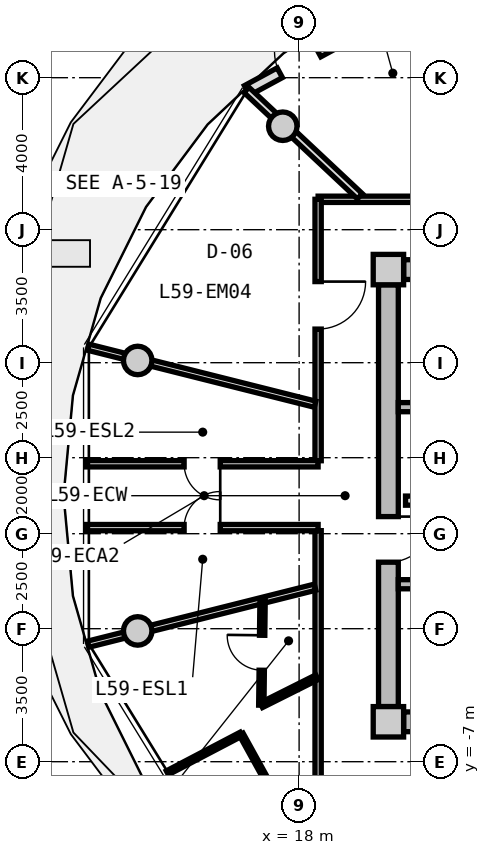
"""IFC4 building model, lengths in metres.
Left out: names, types, materials, properties, quantities, classifications, styles, units other than length and angle.
Written with IfcOpenShell. Run it as: python <this file> out.ifc"""

import sys

from ifc_helpers import new_model, si_unit, direction, frame, frame_2d, origin, origin_2d, place, context, subcontext, project, spatial, rectangle, circle, extrude, source, transform, mapped, element, fill, save


model = new_model("IFC4")
c1 = context("Model", 3, precision=1e-05, world=origin(), true_north=direction((0.0, 1.0)))
c2 = subcontext(c1, "Body", "Model", "MODEL_VIEW")
j1 = project(units=[si_unit("LENGTHUNIT", "METRE"), si_unit("PLANEANGLEUNIT", "RADIAN")], contexts=[c1])
p1 = place(None, origin())
s1 = spatial("IfcSite", under=j1, at=p1, CompositionType="ELEMENT")
p2 = place(p1, origin())
s2 = spatial("IfcBuilding", under=s1, at=p2, CompositionType="ELEMENT")
p3 = place(p2, frame((0.0, 0.0, 190.65)))
s3 = spatial("IfcBuildingStorey", under=s2, at=p3, CompositionType="ELEMENT", Elevation=190.65)
m1 = source(origin(), c2, "Body", "SweptSolid", [
    extrude(rectangle(XDim=0.8, YDim=0.8, at=origin_2d()), origin(), (0.0, 0.0, 1.0), 3.05),
])
for number, where, z_axis, x_axis in (
    (1, (20.35, -5.95, 0.0), (0.0, 0.0, 1.0), (1.0, 0.0, 0.0)),
    (2, (20.35, 5.95, 0.0), (0.0, 0.0, 1.0), (1.0, 0.0, 0.0)),
):
    element("IfcColumn", number, at=place(p3, frame(where, z_axis=z_axis, x_axis=x_axis)), inside=s3, PredefinedType="COLUMN", context=c2, shape_type="MappedRepresentation", body=[
        mapped(m1, transform((0.0, 0.0, 0.0), x_axis=(1.0, 0.0, 0.0), y_axis=(0.0, 1.0, 0.0), z_axis=(0.0, 0.0, 1.0), scale=1.0)),
    ])
m2 = source(origin(), c2, "Body", "SweptSolid", [
    extrude(rectangle(XDim=14.5, YDim=0.52, at=frame_2d((7.25, 0.0))), origin(), (0.0, 0.0, 1.0), 2.81),
])
for number, where, z_axis, x_axis in (
    (3, (20.75, 5.95, 0.0), (0.0, 0.0, 1.0), (1.0, 0.0, 0.0)),
    (4, (35.25, -5.95, 0.0), (0.0, 0.0, 1.0), (-1.0, 0.0, 0.0)),
):
    element("IfcWall", number, at=place(p3, frame(where, z_axis=z_axis, x_axis=x_axis)), inside=s3, PredefinedType="SHEAR", context=c2, shape_type="MappedRepresentation", body=[
        mapped(m2, transform((0.0, 0.0, 0.0), x_axis=(1.0, 0.0, 0.0), y_axis=(0.0, 1.0, 0.0), z_axis=(0.0, 0.0, 1.0), scale=1.0)),
    ])
m3 = source(origin(), c2, "Body", "SweptSolid", [
    extrude(rectangle(XDim=11.1, YDim=0.52, at=frame_2d((5.55, 0.0))), origin(), (0.0, 0.0, 1.0), 2.81),
])
p4 = place(p3, frame((20.35, -5.55, 0.0), z_axis=(0.0, 0.0, 1.0), x_axis=(0.0, 1.0, 0.0)))
e5 = element("IfcWall", 5, at=p4, inside=s3, PredefinedType="SHEAR", context=c2, shape_type="MappedRepresentation", body=[
    mapped(m3, transform((0.0, 0.0, 0.0), x_axis=(1.0, 0.0, 0.0), y_axis=(0.0, 1.0, 0.0), z_axis=(0.0, 0.0, 1.0), scale=1.0)),
])
p5 = place(p4, frame((3.8, 0.0, 0.0)))
e6 = element("IfcOpeningElement", 6, at=p5, cuts=e5, PredefinedType="OPENING", context=c2, shape_type="SweptSolid", body=[
    extrude(rectangle(XDim=1.2, YDim=2.15, at=frame_2d((0.6, 1.075))), frame((0.0, 0.27, 0.0), z_axis=(0.0, -1.0, 0.0), x_axis=(1.0, 0.0, 0.0)), (0.0, 0.0, 1.0), 0.54),
])
m4 = source(origin(), c2, "Body", "SweptSolid", [
    extrude(circle(Radius=0.375, at=origin_2d()), origin(), (0.0, 0.0, 1.0), 3.47),
])
for number, where, z_axis, x_axis in (
    (7, (17.57, 9.723, -0.42), (0.0, 0.0, 1.0), (1.0, 0.0, 0.0)),
    (8, (13.753, 3.559, -0.42), (0.0, 0.0, 1.0), (1.0, 0.0, 0.0)),
    (9, (13.753, -3.559, -0.42), (0.0, 0.0, 1.0), (1.0, 0.0, 0.0)),
):
    element("IfcColumn", number, at=place(p3, frame(where, z_axis=z_axis, x_axis=x_axis)), inside=s3, PredefinedType="COLUMN", context=c2, shape_type="MappedRepresentation", body=[
        mapped(m4, transform((0.0, 0.0, 0.0), x_axis=(1.0, 0.0, 0.0), y_axis=(0.0, 1.0, 0.0), z_axis=(0.0, 0.0, 1.0), scale=1.0)),
    ])
m5 = source(origin(), c2, "Body", "SweptSolid", [
    extrude(rectangle(XDim=8.197, YDim=0.29, at=frame_2d((4.099, 0.0))), origin(), (0.0, 0.0, 1.0), 2.81),
])
p6 = place(p3, frame((16.63, 10.663, 0.0), z_axis=(0.0, 0.0, 1.0), x_axis=(0.879369910001, 0.476139224791, 0.0)))
e10 = element("IfcWall", 10, at=p6, inside=s3, PredefinedType="SOLIDWALL", context=c2, shape_type="MappedRepresentation", body=[
    mapped(m5, transform((0.0, 0.0, 0.0), x_axis=(1.0, 0.0, 0.0), y_axis=(0.0, 1.0, 0.0), z_axis=(0.0, 0.0, 1.0), scale=1.0)),
])
p7 = place(p6, frame((0.98, 0.0, 0.0)))
e11 = element("IfcOpeningElement", 11, at=p7, cuts=e10, PredefinedType="OPENING", context=c2, shape_type="SweptSolid", body=[
    extrude(rectangle(XDim=1.15, YDim=2.25, at=frame_2d((0.575, 1.125))), frame((0.0, 0.155, 0.0), z_axis=(0.0, -1.0, 0.0), x_axis=(1.0, 0.0, 0.0)), (0.0, 0.0, 1.0), 0.31),
])
p8 = place(p6, frame((4.448, 0.0, 0.85)))
e12 = element("IfcOpeningElement", 12, at=p8, cuts=e10, PredefinedType="OPENING", context=c2, shape_type="SweptSolid", body=[
    extrude(rectangle(XDim=1.2, YDim=1.5, at=frame_2d((0.6, 0.75))), frame((0.0, 0.155, 0.0), z_axis=(0.0, -1.0, 0.0), x_axis=(1.0, 0.0, 0.0)), (0.0, 0.0, 1.0), 0.31),
])
m6 = source(origin(), c2, "Body", "SweptSolid", [
    extrude(rectangle(XDim=7.93, YDim=0.24, at=frame_2d((3.965, 0.0))), origin(), (0.0, 0.0, 1.0), 2.81),
])
p9 = place(p3, frame((20.61, 2.33, 0.0), z_axis=(0.0, 0.0, 1.0), x_axis=(1.0, 0.0, 0.0)))
e13 = element("IfcWall", 13, at=p9, inside=s3, PredefinedType="PARTITIONING", context=c2, shape_type="MappedRepresentation", body=[
    mapped(m6, transform((0.0, 0.0, 0.0), x_axis=(1.0, 0.0, 0.0), y_axis=(0.0, 1.0, 0.0), z_axis=(0.0, 0.0, 1.0), scale=1.0)),
])
p10 = place(p3, frame((20.61, -2.33, 0.0), z_axis=(0.0, 0.0, 1.0), x_axis=(1.0, 0.0, 0.0)))
e14 = element("IfcWall", 14, at=p10, inside=s3, PredefinedType="PARTITIONING", context=c2, shape_type="MappedRepresentation", body=[
    mapped(m6, transform((0.0, 0.0, 0.0), x_axis=(1.0, 0.0, 0.0), y_axis=(0.0, 1.0, 0.0), z_axis=(0.0, 0.0, 1.0), scale=1.0)),
])
p11 = place(p10, frame((1.05, 0.0, 0.0)))
e15 = element("IfcOpeningElement", 15, at=p11, cuts=e14, PredefinedType="OPENING", context=c2, shape_type="SweptSolid", body=[
    extrude(rectangle(XDim=1.1, YDim=2.15, at=frame_2d((0.55, 1.075))), frame((0.0, 0.13, 0.0), z_axis=(0.0, -1.0, 0.0), x_axis=(1.0, 0.0, 0.0)), (0.0, 0.0, 1.0), 0.26),
])
m7 = source(origin(), c2, "Body", "SweptSolid", [
    extrude(rectangle(XDim=7.62, YDim=0.24, at=frame_2d((3.81, 0.0))), origin(), (0.0, 0.0, 1.0), 2.795),
])
p12 = place(p3, frame((20.8, -0.13, 0.0), z_axis=(0.0, 0.0, 1.0), x_axis=(1.0, 0.0, 0.0)))
e16 = element("IfcWall", 16, at=p12, inside=s3, PredefinedType="PARTITIONING", context=c2, shape_type="MappedRepresentation", body=[
    mapped(m7, transform((0.0, 0.0, 0.0), x_axis=(1.0, 0.0, 0.0), y_axis=(0.0, 1.0, 0.0), z_axis=(0.0, 0.0, 1.0), scale=1.0)),
])
p13 = place(p12, frame((6.22, 0.0, 0.0)))
e17 = element("IfcOpeningElement", 17, at=p13, cuts=e16, PredefinedType="OPENING", context=c2, shape_type="SweptSolid", body=[
    extrude(rectangle(XDim=1.0, YDim=2.1, at=frame_2d((0.5, 1.05))), frame((0.0, 0.13, 0.0), z_axis=(0.0, -1.0, 0.0), x_axis=(1.0, 0.0, 0.0)), (0.0, 0.0, 1.0), 0.26),
])
p14 = place(p12, frame((2.4, 0.0, 0.0)))
e18 = element("IfcOpeningElement", 18, at=p14, cuts=e16, PredefinedType="OPENING", context=c2, shape_type="SweptSolid", body=[
    extrude(rectangle(XDim=1.0, YDim=2.1, at=frame_2d((0.5, 1.05))), frame((0.0, 0.13, 0.0), z_axis=(0.0, -1.0, 0.0), x_axis=(1.0, 0.0, 0.0)), (0.0, 0.0, 1.0), 0.26),
])
m8 = source(origin(), c2, "Body", "SweptSolid", [
    extrude(rectangle(XDim=8.58, YDim=0.165, at=frame_2d((4.29, 0.0))), origin(), (0.0, 0.0, 1.0), 2.795),
])
p15 = place(p3, frame((18.5, 7.8, 0.0), z_axis=(0.0, 0.0, 1.0), x_axis=(1.0, 0.0, 0.0)))
e19 = element("IfcWall", 19, at=p15, inside=s3, PredefinedType="PARTITIONING", context=c2, shape_type="MappedRepresentation", body=[
    mapped(m8, transform((0.0, 0.0, 0.0), x_axis=(1.0, 0.0, 0.0), y_axis=(0.0, 1.0, 0.0), z_axis=(0.0, 0.0, 1.0), scale=1.0)),
])
p16 = place(p15, frame((2.515, 0.0, 0.0)))
e20 = element("IfcOpeningElement", 20, at=p16, cuts=e19, PredefinedType="OPENING", context=c2, shape_type="SweptSolid", body=[
    extrude(rectangle(XDim=1.05, YDim=2.15, at=frame_2d((0.525, 1.075))), frame((0.0, 0.093, 0.0), z_axis=(0.0, -1.0, 0.0), x_axis=(1.0, 0.0, 0.0)), (0.0, 0.0, 1.0), 0.185),
])
m9 = source(origin(), c2, "Body", "SweptSolid", [
    extrude(rectangle(XDim=6.88, YDim=0.165, at=frame_2d((3.44, 0.0))), origin(), (0.0, 0.0, 1.0), 2.795),
])
p17 = place(p3, frame((18.5, -7.8, 0.0), z_axis=(0.0, 0.0, 1.0), x_axis=(0.0, 1.0, 0.0)))
e21 = element("IfcWall", 21, at=p17, inside=s3, PredefinedType="PARTITIONING", context=c2, shape_type="MappedRepresentation", body=[
    mapped(m9, transform((0.0, 0.0, 0.0), x_axis=(1.0, 0.0, 0.0), y_axis=(0.0, 1.0, 0.0), z_axis=(0.0, 0.0, 1.0), scale=1.0)),
])
p18 = place(p3, frame((18.5, 0.92, 0.0), z_axis=(0.0, 0.0, 1.0), x_axis=(0.0, 1.0, 0.0)))
e22 = element("IfcWall", 22, at=p18, inside=s3, PredefinedType="PARTITIONING", context=c2, shape_type="MappedRepresentation", body=[
    mapped(m9, transform((0.0, 0.0, 0.0), x_axis=(1.0, 0.0, 0.0), y_axis=(0.0, 1.0, 0.0), z_axis=(0.0, 0.0, 1.0), scale=1.0)),
])
p19 = place(p18, frame((3.464, 0.0, 0.0)))
e23 = element("IfcOpeningElement", 23, at=p19, cuts=e22, PredefinedType="OPENING", context=c2, shape_type="SweptSolid", body=[
    extrude(rectangle(XDim=1.25, YDim=2.2, at=frame_2d((0.625, 1.1))), frame((0.0, 0.093, 0.0), z_axis=(0.0, -1.0, 0.0), x_axis=(1.0, 0.0, 0.0)), (0.0, 0.0, 1.0), 0.185),
])
m10 = source(origin(), c2, "Body", "SweptSolid", [
    extrude(rectangle(XDim=6.157, YDim=0.165, at=frame_2d((3.079, 0.0))), origin(), (0.0, 0.0, 1.0), 2.395),
])
for number, where, z_axis, x_axis in (
    (24, (18.42, 2.407, 0.0), (0.0, 0.0, 1.0), (-0.97, 0.244, 0.0)),
    (25, (18.42, -2.407, 0.0), (0.0, 0.0, 1.0), (-0.97, -0.244, 0.0)),
):
    element("IfcWall", number, at=place(p3, frame(where, z_axis=z_axis, x_axis=x_axis)), inside=s3, PredefinedType="PARTITIONING", context=c2, shape_type="MappedRepresentation", body=[
        mapped(m10, transform((0.0, 0.0, 0.0), x_axis=(1.0, 0.0, 0.0), y_axis=(0.0, 1.0, 0.0), z_axis=(0.0, 0.0, 1.0), scale=1.0)),
    ])
m11 = source(origin(), c2, "Body", "SweptSolid", [
    extrude(rectangle(XDim=6.101, YDim=0.165, at=frame_2d((3.051, 0.0))), origin(), (0.0, 0.0, 1.0), 2.795),
])
p20 = place(p3, frame((12.399, 0.84, 0.0), z_axis=(0.0, 0.0, 1.0), x_axis=(1.0, 0.0, 0.0)))
e26 = element("IfcWall", 26, at=p20, inside=s3, PredefinedType="PARTITIONING", context=c2, shape_type="MappedRepresentation", body=[
    mapped(m11, transform((0.0, 0.0, 0.0), x_axis=(1.0, 0.0, 0.0), y_axis=(0.0, 1.0, 0.0), z_axis=(0.0, 0.0, 1.0), scale=1.0)),
])
p21 = place(p20, frame((2.576, 0.0, 0.0)))
e27 = element("IfcOpeningElement", 27, at=p21, cuts=e26, PredefinedType="OPENING", context=c2, shape_type="SweptSolid", body=[
    extrude(rectangle(XDim=0.95, YDim=2.1, at=frame_2d((0.475, 1.05))), frame((0.0, 0.093, 0.0), z_axis=(0.0, -1.0, 0.0), x_axis=(1.0, 0.0, 0.0)), (0.0, 0.0, 1.0), 0.185),
])
p22 = place(p3, frame((18.5, -0.84, 0.0), z_axis=(0.0, 0.0, 1.0), x_axis=(-1.0, 0.0, 0.0)))
e28 = element("IfcWall", 28, at=p22, inside=s3, PredefinedType="PARTITIONING", context=c2, shape_type="MappedRepresentation", body=[
    mapped(m11, transform((0.0, 0.0, 0.0), x_axis=(1.0, 0.0, 0.0), y_axis=(0.0, 1.0, 0.0), z_axis=(0.0, 0.0, 1.0), scale=1.0)),
])
p23 = place(p22, frame((2.576, 0.0, 0.0)))
e29 = element("IfcOpeningElement", 29, at=p23, cuts=e28, PredefinedType="OPENING", context=c2, shape_type="SweptSolid", body=[
    extrude(rectangle(XDim=0.95, YDim=2.1, at=frame_2d((0.475, 1.05))), frame((0.0, 0.093, 0.0), z_axis=(0.0, -1.0, 0.0), x_axis=(1.0, 0.0, 0.0)), (0.0, 0.0, 1.0), 0.185),
])
m12 = source(origin(), c2, "Body", "SweptSolid", [
    extrude(rectangle(XDim=4.089, YDim=0.19, at=frame_2d((2.044, 0.0))), origin(), (0.0, 0.0, 1.0), 2.395),
])
p24 = place(p3, frame((19.598, 7.88, 0.0), z_axis=(0.0, 0.0, 1.0), x_axis=(-0.729401273609, 0.684086092577, 0.0)))
e30 = element("IfcWall", 30, at=p24, inside=s3, PredefinedType="PARTITIONING", context=c2, shape_type="MappedRepresentation", body=[
    mapped(m12, transform((0.0, 0.0, 0.0), x_axis=(1.0, 0.0, 0.0), y_axis=(0.0, 1.0, 0.0), z_axis=(0.0, 0.0, 1.0), scale=1.0)),
])
m13 = source(origin(), c2, "Body", "SweptSolid", [
    extrude(rectangle(XDim=1.638, YDim=0.14, at=frame_2d((0.819, 0.0))), origin(), (0.0, 0.0, 1.0), 2.795),
])
p25 = place(p3, frame((18.47, -4.778, 0.0), z_axis=(0.0, 0.0, 1.0), x_axis=(-0.893919977945, -0.448226586707, 0.0)))
e31 = element("IfcWall", 31, at=p25, inside=s3, PredefinedType="PARTITIONING", context=c2, shape_type="MappedRepresentation", body=[
    mapped(m13, transform((0.0, 0.0, 0.0), x_axis=(1.0, 0.0, 0.0), y_axis=(0.0, 1.0, 0.0), z_axis=(0.0, 0.0, 1.0), scale=1.0)),
])
m14 = source(origin(), c2, "Body", "SweptSolid", [
    extrude(rectangle(XDim=2.759, YDim=0.14, at=frame_2d((1.379, 0.0))), origin(), (0.0, 0.0, 1.0), 2.795),
])
p26 = place(p3, frame((17.005, -5.513, 0.0), z_axis=(0.0, 0.0, 1.0), x_axis=(0.01194710728, 0.999928630767, 0.0)))
e32 = element("IfcWall", 32, at=p26, inside=s3, PredefinedType="PARTITIONING", context=c2, shape_type="MappedRepresentation", body=[
    mapped(m14, transform((0.0, 0.0, 0.0), x_axis=(1.0, 0.0, 0.0), y_axis=(0.0, 1.0, 0.0), z_axis=(0.0, 0.0, 1.0), scale=1.0)),
])
p27 = place(p26, frame((0.919, 0.0, 0.0)))
e33 = element("IfcOpeningElement", 33, at=p27, cuts=e32, PredefinedType="OPENING", context=c2, shape_type="SweptSolid", body=[
    extrude(rectangle(XDim=0.92, YDim=2.1, at=frame_2d((0.46, 1.05))), frame((0.0, 0.08, 0.0), z_axis=(0.0, -1.0, 0.0), x_axis=(1.0, 0.0, 0.0)), (0.0, 0.0, 1.0), 0.16),
])
m15 = source(origin(), c2, "Body", "SweptSolid", [
    extrude(rectangle(XDim=2.193, YDim=0.115, at=frame_2d((1.097, 0.0))), origin(), (0.0, 0.0, 1.0), 2.795),
])
p28 = place(p3, frame((16.475, -6.275, 0.0), z_axis=(0.0, 0.0, 1.0), x_axis=(-0.885783595046, -0.464098505435, 0.0)))
e34 = element("IfcWall", 34, at=p28, inside=s3, PredefinedType="PARTITIONING", context=c2, shape_type="MappedRepresentation", body=[
    mapped(m15, transform((0.0, 0.0, 0.0), x_axis=(1.0, 0.0, 0.0), y_axis=(0.0, 1.0, 0.0), z_axis=(0.0, 0.0, 1.0), scale=1.0)),
])
m16 = source(origin(), c2, "Body", "SweptSolid", [
    extrude(rectangle(XDim=3.45, YDim=0.115, at=frame_2d((1.725, 0.0))), origin(), (0.0, 0.0, 1.0), 2.795),
])
p29 = place(p3, frame((16.475, -6.275, 0.0), z_axis=(0.0, 0.0, 1.0), x_axis=(0.483659007882, -0.875256513312, 0.0)))
e35 = element("IfcWall", 35, at=p29, inside=s3, PredefinedType="PARTITIONING", context=c2, shape_type="MappedRepresentation", body=[
    mapped(m16, transform((0.0, 0.0, 0.0), x_axis=(1.0, 0.0, 0.0), y_axis=(0.0, 1.0, 0.0), z_axis=(0.0, 0.0, 1.0), scale=1.0)),
])
p30 = place(p29, frame((1.9, 0.0, 0.0)))
e36 = element("IfcOpeningElement", 36, at=p30, cuts=e35, PredefinedType="OPENING", context=c2, shape_type="SweptSolid", body=[
    extrude(rectangle(XDim=0.95, YDim=2.1, at=frame_2d((0.475, 1.05))), frame((0.0, 0.067, 0.0), z_axis=(0.0, -1.0, 0.0), x_axis=(1.0, 0.0, 0.0)), (0.0, 0.0, 1.0), 0.135),
])
m17 = source(origin(), c2, "Body", "SweptSolid", [
    extrude(rectangle(XDim=1.15, YDim=2.25, at=frame_2d((0.575, 1.125))), frame((0.0, 0.025, 0.0), z_axis=(0.0, -1.0, 0.0), x_axis=(1.0, 0.0, 0.0)), (0.0, 0.0, 1.0), 0.05),
])
p31 = place(p7, origin())
e37 = element("IfcDoor", 37, at=p31, inside=s3, OperationType="SINGLE_SWING_RIGHT", PredefinedType="DOOR", context=c2, shape_type="MappedRepresentation", body=[
    mapped(m17, transform((0.0, 0.0, 0.0), x_axis=(1.0, 0.0, 0.0), y_axis=(0.0, 1.0, 0.0), z_axis=(0.0, 0.0, 1.0), scale=1.0)),
])
fill(e11, e37)
m18 = source(origin(), c2, "Body", "SweptSolid", [
    extrude(rectangle(XDim=1.2, YDim=2.15, at=frame_2d((0.6, 1.075))), frame((0.0, 0.025, 0.0), z_axis=(0.0, -1.0, 0.0), x_axis=(1.0, 0.0, 0.0)), (0.0, 0.0, 1.0), 0.05),
])
p32 = place(p5, frame((1.2, 0.0, 0.0), z_axis=(0.0, 0.0, 1.0), x_axis=(-1.0, 0.0, 0.0)))
e38 = element("IfcDoor", 38, at=p32, inside=s3, OperationType="SINGLE_SWING_LEFT", PredefinedType="DOOR", context=c2, shape_type="MappedRepresentation", body=[
    mapped(m18, transform((0.0, 0.0, 0.0), x_axis=(1.0, 0.0, 0.0), y_axis=(0.0, 1.0, 0.0), z_axis=(0.0, 0.0, 1.0), scale=1.0)),
])
fill(e6, e38)
m19 = source(origin(), c2, "Body", "SweptSolid", [
    extrude(rectangle(XDim=0.95, YDim=2.1, at=frame_2d((0.475, 1.05))), frame((0.0, 0.025, 0.0), z_axis=(0.0, -1.0, 0.0), x_axis=(1.0, 0.0, 0.0)), (0.0, 0.0, 1.0), 0.05),
])
p33 = place(p23, frame((0.95, 0.0, 0.0), z_axis=(0.0, 0.0, 1.0), x_axis=(-1.0, 0.0, 0.0)))
e39 = element("IfcDoor", 39, at=p33, inside=s3, OperationType="SINGLE_SWING_RIGHT", PredefinedType="DOOR", context=c2, shape_type="MappedRepresentation", body=[
    mapped(m19, transform((0.0, 0.0, 0.0), x_axis=(1.0, 0.0, 0.0), y_axis=(0.0, 1.0, 0.0), z_axis=(0.0, 0.0, 1.0), scale=1.0)),
])
fill(e29, e39)
p34 = place(p21, frame((0.95, 0.0, 0.0), z_axis=(0.0, 0.0, 1.0), x_axis=(-1.0, 0.0, 0.0)))
e40 = element("IfcDoor", 40, at=p34, inside=s3, OperationType="SINGLE_SWING_LEFT", PredefinedType="DOOR", context=c2, shape_type="MappedRepresentation", body=[
    mapped(m19, transform((0.0, 0.0, 0.0), x_axis=(1.0, 0.0, 0.0), y_axis=(0.0, 1.0, 0.0), z_axis=(0.0, 0.0, 1.0), scale=1.0)),
])
fill(e27, e40)
m20 = source(origin(), c2, "Body", "SweptSolid", [
    extrude(rectangle(XDim=1.25, YDim=2.2, at=frame_2d((0.625, 1.1))), frame((0.0, 0.025, 0.0), z_axis=(0.0, -1.0, 0.0), x_axis=(1.0, 0.0, 0.0)), (0.0, 0.0, 1.0), 0.05),
])
p35 = place(p19, frame((1.25, 0.0, 0.0), z_axis=(0.0, 0.0, 1.0), x_axis=(-1.0, 0.0, 0.0)))
e41 = element("IfcDoor", 41, at=p35, inside=s3, OperationType="SINGLE_SWING_LEFT", PredefinedType="DOOR", context=c2, shape_type="MappedRepresentation", body=[
    mapped(m20, transform((0.0, 0.0, 0.0), x_axis=(1.0, 0.0, 0.0), y_axis=(0.0, 1.0, 0.0), z_axis=(0.0, 0.0, 1.0), scale=1.0)),
])
fill(e23, e41)
m21 = source(origin(), c2, "Body", "SweptSolid", [
    extrude(rectangle(XDim=0.92, YDim=2.1, at=frame_2d((0.46, 1.05))), frame((0.0, 0.025, 0.0), z_axis=(0.0, -1.0, 0.0), x_axis=(1.0, 0.0, 0.0)), (0.0, 0.0, 1.0), 0.05),
])
p36 = place(p27, origin())
e42 = element("IfcDoor", 42, at=p36, inside=s3, OperationType="SINGLE_SWING_RIGHT", PredefinedType="DOOR", context=c2, shape_type="MappedRepresentation", body=[
    mapped(m21, transform((0.0, 0.0, 0.0), x_axis=(1.0, 0.0, 0.0), y_axis=(0.0, 1.0, 0.0), z_axis=(0.0, 0.0, 1.0), scale=1.0)),
])
fill(e33, e42)
save(model, sys.argv[1])
